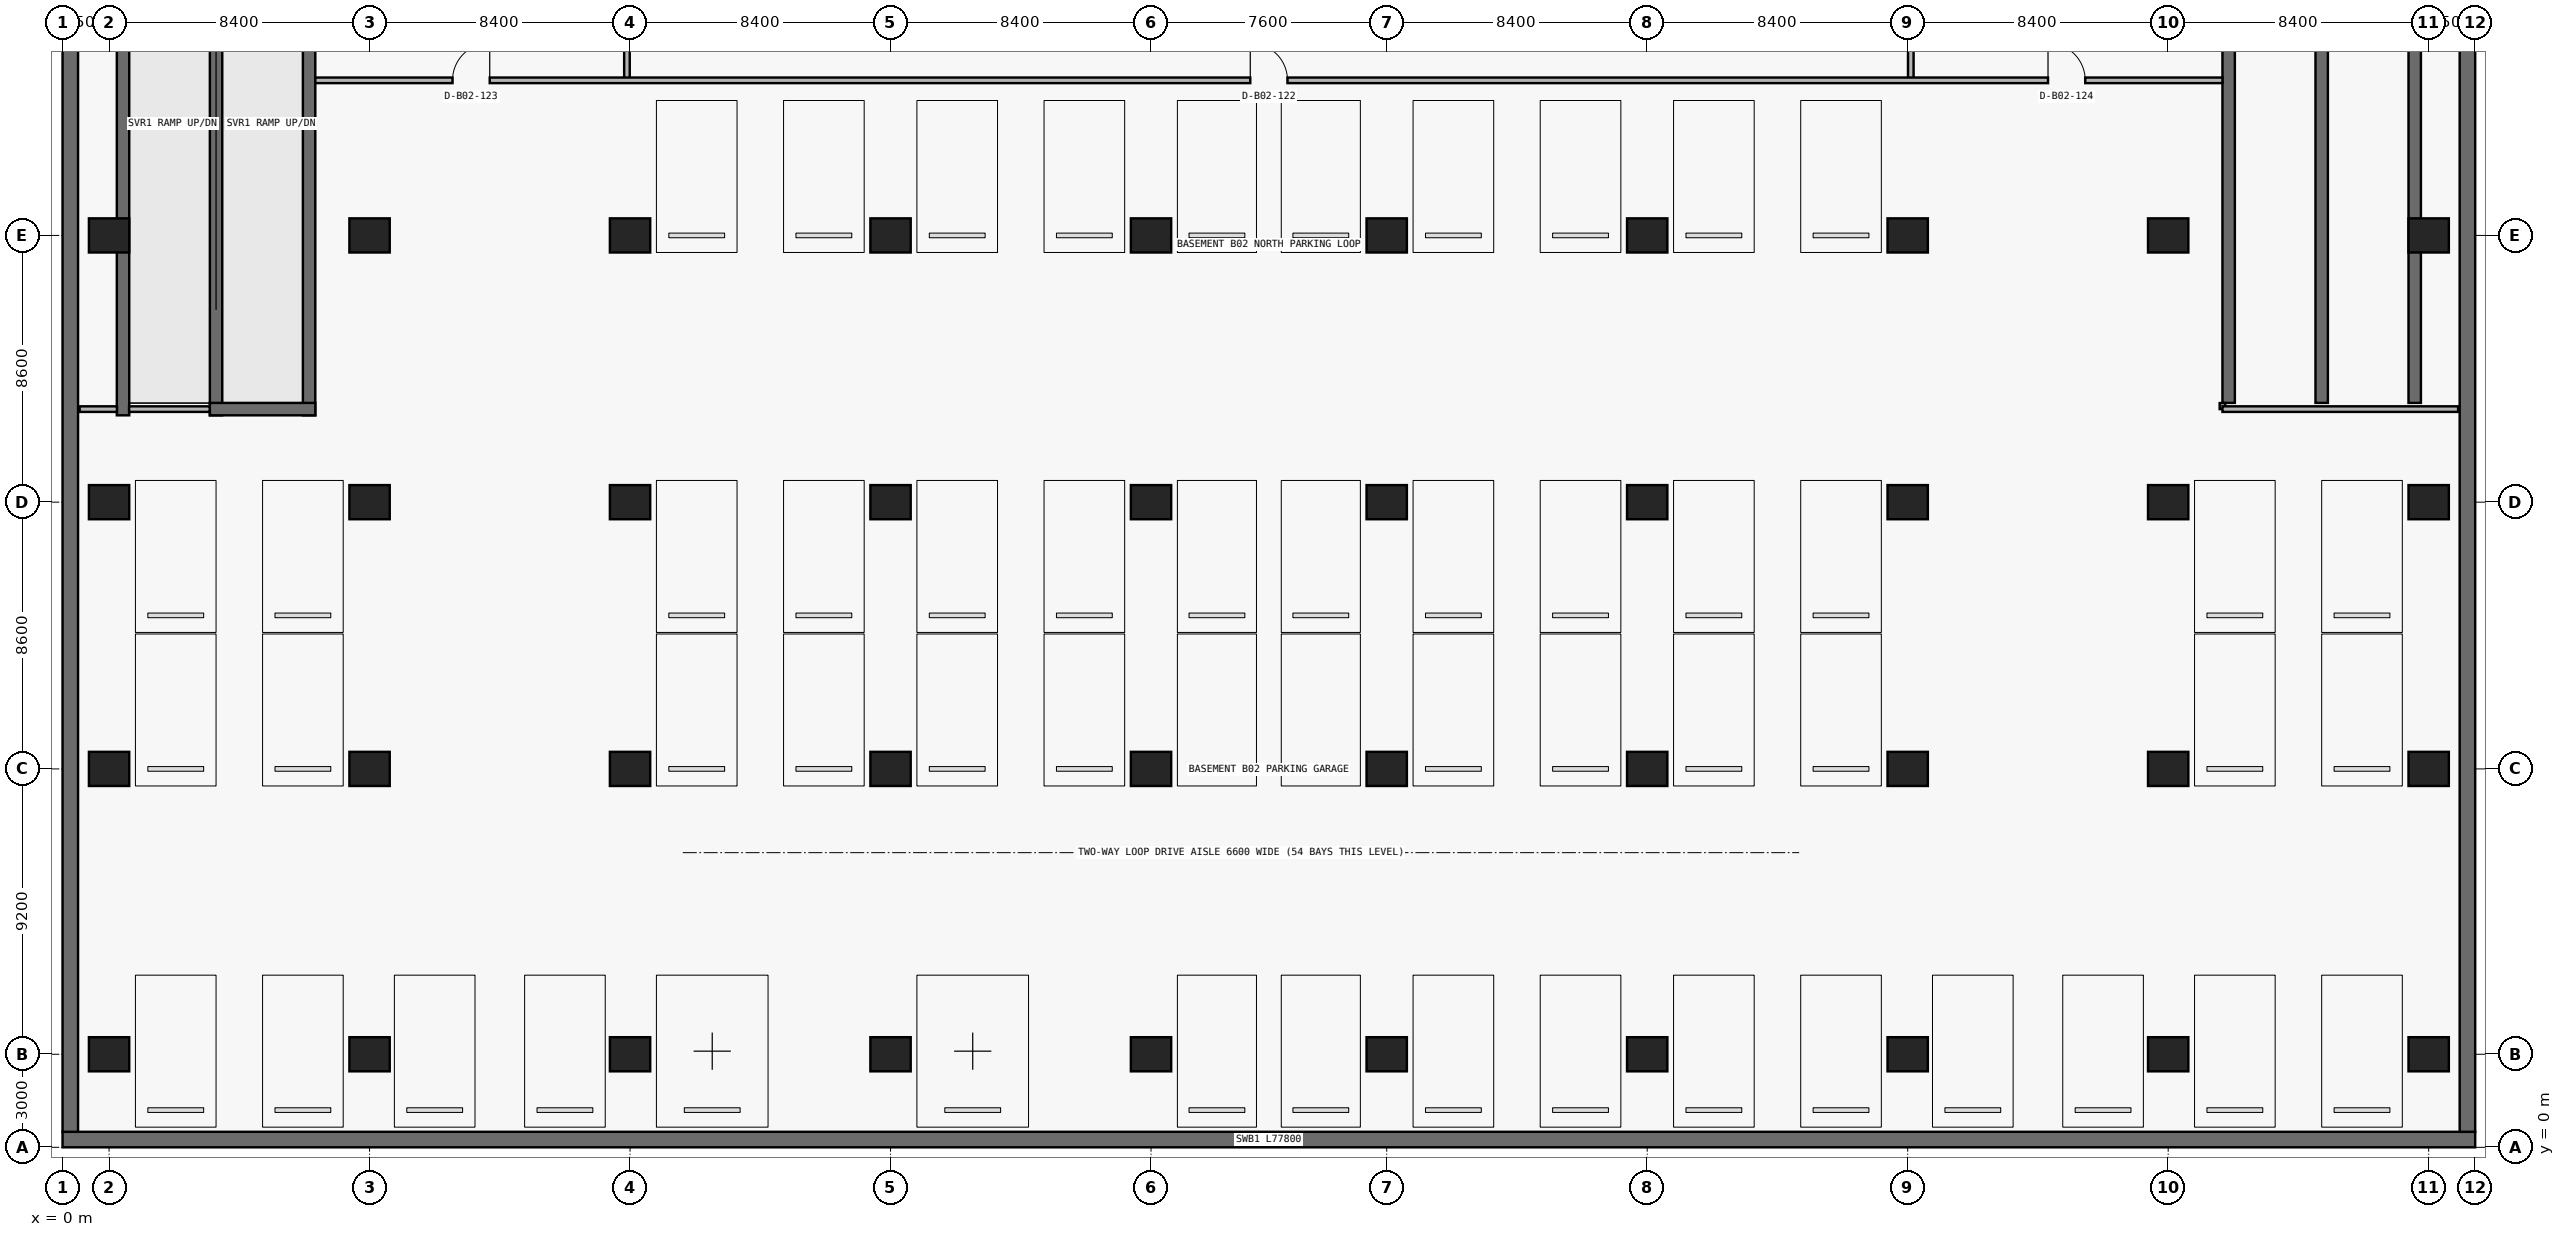
"""IFC4 building model, lengths in metres.
Left out: names, types, materials, properties, quantities, classifications, styles, units other than length and angle.
Written with IfcOpenShell. Run it as: python <this file> out.ifc"""

import sys

from ifc_helpers import new_model, si_unit, direction, frame, frame_2d, origin, origin_2d, place, context, subcontext, project, spatial, rectangle, extrude, element, fill, save


model = new_model("IFC4")
c1 = context("Model", 3, precision=1e-05, world=origin(), true_north=direction((0.0, 1.0)))
c2 = subcontext(c1, "Body", "Model", "MODEL_VIEW")
j1 = project(units=[si_unit("LENGTHUNIT", "METRE"), si_unit("PLANEANGLEUNIT", "RADIAN")], contexts=[c1])
p1 = place(None, origin())
s1 = spatial("IfcSite", under=j1, at=p1, CompositionType="ELEMENT")
p2 = place(p1, origin())
s2 = spatial("IfcBuilding", under=s1, at=p2, CompositionType="ELEMENT")
p3 = place(p2, frame((0.0, 0.0, -9.0)))
s3 = spatial("IfcBuildingStorey", under=s2, at=p3, CompositionType="ELEMENT", Elevation=-9.0)
p4 = place(p3, frame((77.8, 0.25, 0.0), z_axis=(0.0, 0.0, 1.0), x_axis=(-1.0, 0.0, 0.0)))
e1 = element("IfcWall", 1, at=p4, inside=s3, PredefinedType="SOLIDWALL", context=c2, shape_type="SweptSolid", body=[
    extrude(rectangle(XDim=77.8, YDim=0.5, at=frame_2d((38.9, 0.0))), origin(), (0.0, 0.0, 1.0), 4.2),
])
for number, where, z_axis, x_axis in (
    (2, (0.25, 0.5, 0.0), (0.0, 0.0, 1.0), (0.0, 1.0, 0.0)),
    (3, (77.55, 53.3, 0.0), (0.0, 0.0, 1.0), (0.0, -1.0, 0.0)),
):
    element("IfcWall", number, at=place(p3, frame(where, z_axis=z_axis, x_axis=x_axis)), inside=s3, PredefinedType="SOLIDWALL", context=c2, shape_type="SweptSolid", body=[
        extrude(rectangle(XDim=52.8, YDim=0.5, at=frame_2d((26.4, 0.0))), origin(), (0.0, 0.0, 1.0), 4.2),
    ])
for number, where, z_axis, x_axis in (
    (4, (69.85, 24.0, 0.0), (0.0, 0.0, 1.0), (0.0, 1.0, 0.0)),
    (5, (75.85, 24.0, 0.0), (0.0, 0.0, 1.0), (0.0, 1.0, 0.0)),
):
    element("IfcWall", number, at=place(p3, frame(where, z_axis=z_axis, x_axis=x_axis)), inside=s3, PredefinedType="SHEAR", context=c2, shape_type="SweptSolid", body=[
        extrude(rectangle(XDim=23.8, YDim=0.4, at=frame_2d((11.9, 0.0))), origin(), (0.0, 0.0, 1.0), 4.2),
    ])
p5 = place(p3, frame((72.85, 24.0, 0.0), z_axis=(0.0, 0.0, 1.0), x_axis=(0.0, 1.0, 0.0)))
e6 = element("IfcWall", 6, at=p5, inside=s3, PredefinedType="SHEAR", context=c2, shape_type="SweptSolid", body=[
    extrude(rectangle(XDim=18.0, YDim=0.4, at=frame_2d((9.0, 0.0))), origin(), (0.0, 0.0, 1.0), 4.2),
])
for number, where, z_axis, x_axis in (
    (7, (1.95, 23.6, 0.0), (0.0, 0.0, 1.0), (0.0, 1.0, 0.0)),
    (8, (7.95, 23.6, 0.0), (0.0, 0.0, 1.0), (0.0, 1.0, 0.0)),
):
    element("IfcWall", number, at=place(p3, frame(where, z_axis=z_axis, x_axis=x_axis)), inside=s3, PredefinedType="SHEAR", context=c2, shape_type="SweptSolid", body=[
        extrude(rectangle(XDim=24.2, YDim=0.4, at=frame_2d((12.1, 0.0))), origin(), (0.0, 0.0, 1.0), 4.2),
    ])
p6 = place(p3, frame((4.95, 23.6, 0.0), z_axis=(0.0, 0.0, 1.0), x_axis=(0.0, 1.0, 0.0)))
e9 = element("IfcWall", 9, at=p6, inside=s3, PredefinedType="SHEAR", context=c2, shape_type="SweptSolid", body=[
    extrude(rectangle(XDim=18.4, YDim=0.4, at=frame_2d((9.2, 0.0))), origin(), (0.0, 0.0, 1.0), 4.2),
])
p7 = place(p3, frame((4.75, 23.8, 0.0), z_axis=(0.0, 0.0, 1.0), x_axis=(1.0, 0.0, 0.0)))
e10 = element("IfcWall", 10, at=p7, inside=s3, PredefinedType="SHEAR", context=c2, shape_type="SweptSolid", body=[
    extrude(rectangle(XDim=3.4, YDim=0.4, at=frame_2d((1.7, 0.0))), origin(), (0.0, 0.0, 1.0), 4.2),
])
for number, where, z_axis, x_axis in (
    (11, (1.5, 3.0, 0.0), (0.0, 0.0, 1.0), (1.0, 0.0, 0.0)),
    (12, (9.9, 3.0, 0.0), (0.0, 0.0, 1.0), (1.0, 0.0, 0.0)),
    (13, (18.3, 3.0, 0.0), (0.0, 0.0, 1.0), (1.0, 0.0, 0.0)),
    (14, (26.7, 3.0, 0.0), (0.0, 0.0, 1.0), (1.0, 0.0, 0.0)),
    (15, (35.1, 3.0, 0.0), (0.0, 0.0, 1.0), (1.0, 0.0, 0.0)),
    (16, (42.7, 3.0, 0.0), (0.0, 0.0, 1.0), (1.0, 0.0, 0.0)),
    (17, (51.1, 3.0, 0.0), (0.0, 0.0, 1.0), (1.0, 0.0, 0.0)),
    (18, (59.5, 3.0, 0.0), (0.0, 0.0, 1.0), (1.0, 0.0, 0.0)),
    (19, (67.9, 3.0, 0.0), (0.0, 0.0, 1.0), (1.0, 0.0, 0.0)),
    (20, (76.3, 3.0, 0.0), (0.0, 0.0, 1.0), (1.0, 0.0, 0.0)),
    (21, (1.5, 12.2, 0.0), (0.0, 0.0, 1.0), (1.0, 0.0, 0.0)),
    (22, (9.9, 12.2, 0.0), (0.0, 0.0, 1.0), (1.0, 0.0, 0.0)),
    (23, (18.3, 12.2, 0.0), (0.0, 0.0, 1.0), (1.0, 0.0, 0.0)),
    (24, (26.7, 12.2, 0.0), (0.0, 0.0, 1.0), (1.0, 0.0, 0.0)),
    (25, (35.1, 12.2, 0.0), (0.0, 0.0, 1.0), (1.0, 0.0, 0.0)),
    (26, (42.7, 12.2, 0.0), (0.0, 0.0, 1.0), (1.0, 0.0, 0.0)),
    (27, (51.1, 12.2, 0.0), (0.0, 0.0, 1.0), (1.0, 0.0, 0.0)),
    (28, (59.5, 12.2, 0.0), (0.0, 0.0, 1.0), (1.0, 0.0, 0.0)),
    (29, (67.9, 12.2, 0.0), (0.0, 0.0, 1.0), (1.0, 0.0, 0.0)),
    (30, (76.3, 12.2, 0.0), (0.0, 0.0, 1.0), (1.0, 0.0, 0.0)),
    (31, (1.5, 20.8, 0.0), (0.0, 0.0, 1.0), (1.0, 0.0, 0.0)),
    (32, (9.9, 20.8, 0.0), (0.0, 0.0, 1.0), (1.0, 0.0, 0.0)),
    (33, (18.3, 20.8, 0.0), (0.0, 0.0, 1.0), (1.0, 0.0, 0.0)),
    (34, (26.7, 20.8, 0.0), (0.0, 0.0, 1.0), (1.0, 0.0, 0.0)),
    (35, (35.1, 20.8, 0.0), (0.0, 0.0, 1.0), (1.0, 0.0, 0.0)),
    (36, (42.7, 20.8, 0.0), (0.0, 0.0, 1.0), (1.0, 0.0, 0.0)),
    (37, (51.1, 20.8, 0.0), (0.0, 0.0, 1.0), (1.0, 0.0, 0.0)),
    (38, (59.5, 20.8, 0.0), (0.0, 0.0, 1.0), (1.0, 0.0, 0.0)),
    (39, (67.9, 20.8, 0.0), (0.0, 0.0, 1.0), (1.0, 0.0, 0.0)),
    (40, (76.3, 20.8, 0.0), (0.0, 0.0, 1.0), (1.0, 0.0, 0.0)),
    (41, (1.5, 29.4, 0.0), (0.0, 0.0, 1.0), (1.0, 0.0, 0.0)),
    (42, (9.9, 29.4, 0.0), (0.0, 0.0, 1.0), (1.0, 0.0, 0.0)),
    (43, (18.3, 29.4, 0.0), (0.0, 0.0, 1.0), (1.0, 0.0, 0.0)),
    (44, (26.7, 29.4, 0.0), (0.0, 0.0, 1.0), (1.0, 0.0, 0.0)),
    (45, (35.1, 29.4, 0.0), (0.0, 0.0, 1.0), (1.0, 0.0, 0.0)),
    (46, (42.7, 29.4, 0.0), (0.0, 0.0, 1.0), (1.0, 0.0, 0.0)),
    (47, (51.1, 29.4, 0.0), (0.0, 0.0, 1.0), (1.0, 0.0, 0.0)),
    (48, (59.5, 29.4, 0.0), (0.0, 0.0, 1.0), (1.0, 0.0, 0.0)),
    (49, (67.9, 29.4, 0.0), (0.0, 0.0, 1.0), (1.0, 0.0, 0.0)),
    (50, (76.3, 29.4, 0.0), (0.0, 0.0, 1.0), (1.0, 0.0, 0.0)),
):
    element("IfcColumn", number, at=place(p3, frame(where, z_axis=z_axis, x_axis=x_axis)), inside=s3, PredefinedType="COLUMN", context=c2, shape_type="SweptSolid", body=[
        extrude(rectangle(XDim=1.3, YDim=1.1, at=origin_2d()), origin(), (0.0, 0.0, 1.0), 4.2),
    ])
for number, where, z_axis, x_axis in (
    (51, (18.2, 34.4, 0.0), (0.0, 0.0, 1.0), (0.0, 1.0, 0.0)),
    (52, (59.6, 34.4, 0.0), (0.0, 0.0, 1.0), (0.0, 1.0, 0.0)),
):
    element("IfcWall", number, at=place(p3, frame(where, z_axis=z_axis, x_axis=x_axis)), inside=s3, PredefinedType="PARTITIONING", context=c2, shape_type="SweptSolid", body=[
        extrude(rectangle(XDim=2.045, YDim=0.18, at=frame_2d((1.022, 0.0))), origin(), (0.0, 0.0, 1.0), 3.085),
    ])
p8 = place(p3, frame((69.65, 23.8, 0.0), z_axis=(0.0, 0.0, 1.0), x_axis=(0.0, 1.0, 0.0)))
e53 = element("IfcWall", 53, at=p8, inside=s3, PredefinedType="PARTITIONING", context=c2, shape_type="SweptSolid", body=[
    extrude(rectangle(XDim=0.195, YDim=0.18, at=frame_2d((0.098, 0.0))), origin(), (0.0, 0.0, 1.0), 3.335),
])
p9 = place(p3, frame((0.55, 23.8, 0.0), z_axis=(0.0, 0.0, 1.0), x_axis=(1.0, 0.0, 0.0)))
e54 = element("IfcWall", 54, at=p9, inside=s3, PredefinedType="PARTITIONING", context=c2, shape_type="SweptSolid", body=[
    extrude(rectangle(XDim=1.205, YDim=0.18, at=frame_2d((0.603, 0.0))), origin(), (0.0, 0.0, 1.0), 4.2),
])
p10 = place(p3, frame((2.145, 23.8, 0.0), z_axis=(0.0, 0.0, 1.0), x_axis=(1.0, 0.0, 0.0)))
e55 = element("IfcWall", 55, at=p10, inside=s3, PredefinedType="PARTITIONING", context=c2, shape_type="SweptSolid", body=[
    extrude(rectangle(XDim=2.6, YDim=0.18, at=frame_2d((1.3, 0.0))), origin(), (0.0, 0.0, 1.0), 4.2),
])
p11 = place(p3, frame((69.65, 23.8, 0.0), z_axis=(0.0, 0.0, 1.0), x_axis=(1.0, 0.0, 0.0)))
e56 = element("IfcWall", 56, at=p11, inside=s3, PredefinedType="PARTITIONING", context=c2, shape_type="SweptSolid", body=[
    extrude(rectangle(XDim=7.6, YDim=0.18, at=frame_2d((3.8, 0.0))), origin(), (0.0, 0.0, 1.0), 4.2),
])
p12 = place(p3, frame((8.15, 34.4, 0.0), z_axis=(0.0, 0.0, 1.0), x_axis=(1.0, 0.0, 0.0)))
e57 = element("IfcWall", 57, at=p12, inside=s3, PredefinedType="PARTITIONING", context=c2, shape_type="SweptSolid", body=[
    extrude(rectangle(XDim=61.5, YDim=0.18, at=frame_2d((30.75, 0.0))), origin(), (0.0, 0.0, 1.0), 4.2),
])
p13 = place(p12, frame((30.15, 0.0, 0.0)))
e58 = element("IfcOpeningElement", 58, at=p13, cuts=e57, PredefinedType="OPENING", context=c2, shape_type="SweptSolid", body=[
    extrude(rectangle(XDim=1.2, YDim=2.2, at=frame_2d((0.6, 1.1))), frame((0.0, 0.1, 0.0), z_axis=(0.0, -1.0, 0.0), x_axis=(1.0, 0.0, 0.0)), (0.0, 0.0, 1.0), 0.2),
])
p14 = place(p12, frame((4.425, 0.0, 0.0)))
e59 = element("IfcOpeningElement", 59, at=p14, cuts=e57, PredefinedType="OPENING", context=c2, shape_type="SweptSolid", body=[
    extrude(rectangle(XDim=1.2, YDim=2.2, at=frame_2d((0.6, 1.1))), frame((0.0, 0.1, 0.0), z_axis=(0.0, -1.0, 0.0), x_axis=(1.0, 0.0, 0.0)), (0.0, 0.0, 1.0), 0.2),
])
p15 = place(p12, frame((55.875, 0.0, 0.0)))
e60 = element("IfcOpeningElement", 60, at=p15, cuts=e57, PredefinedType="OPENING", context=c2, shape_type="SweptSolid", body=[
    extrude(rectangle(XDim=1.2, YDim=2.2, at=frame_2d((0.6, 1.1))), frame((0.0, 0.1, 0.0), z_axis=(0.0, -1.0, 0.0), x_axis=(1.0, 0.0, 0.0)), (0.0, 0.0, 1.0), 0.2),
])
p16 = place(p13, origin())
e61 = element("IfcDoor", 61, at=p16, inside=s3, OperationType="SINGLE_SWING_LEFT", PredefinedType="DOOR", context=c2, shape_type="SweptSolid", body=[
    extrude(rectangle(XDim=1.2, YDim=2.2, at=frame_2d((0.6, 1.1))), frame((0.0, 0.025, 0.0), z_axis=(0.0, -1.0, 0.0), x_axis=(1.0, 0.0, 0.0)), (0.0, 0.0, 1.0), 0.05),
])
fill(e58, e61)
p17 = place(p14, origin())
e62 = element("IfcDoor", 62, at=p17, inside=s3, OperationType="SINGLE_SWING_RIGHT", PredefinedType="DOOR", context=c2, shape_type="SweptSolid", body=[
    extrude(rectangle(XDim=1.2, YDim=2.2, at=frame_2d((0.6, 1.1))), frame((0.0, 0.025, 0.0), z_axis=(0.0, -1.0, 0.0), x_axis=(1.0, 0.0, 0.0)), (0.0, 0.0, 1.0), 0.05),
])
fill(e59, e62)
p18 = place(p15, origin())
e63 = element("IfcDoor", 63, at=p18, inside=s3, OperationType="SINGLE_SWING_LEFT", PredefinedType="DOOR", context=c2, shape_type="SweptSolid", body=[
    extrude(rectangle(XDim=1.2, YDim=2.2, at=frame_2d((0.6, 1.1))), frame((0.0, 0.025, 0.0), z_axis=(0.0, -1.0, 0.0), x_axis=(1.0, 0.0, 0.0)), (0.0, 0.0, 1.0), 0.05),
])
fill(e60, e63)
save(model, sys.argv[1])
